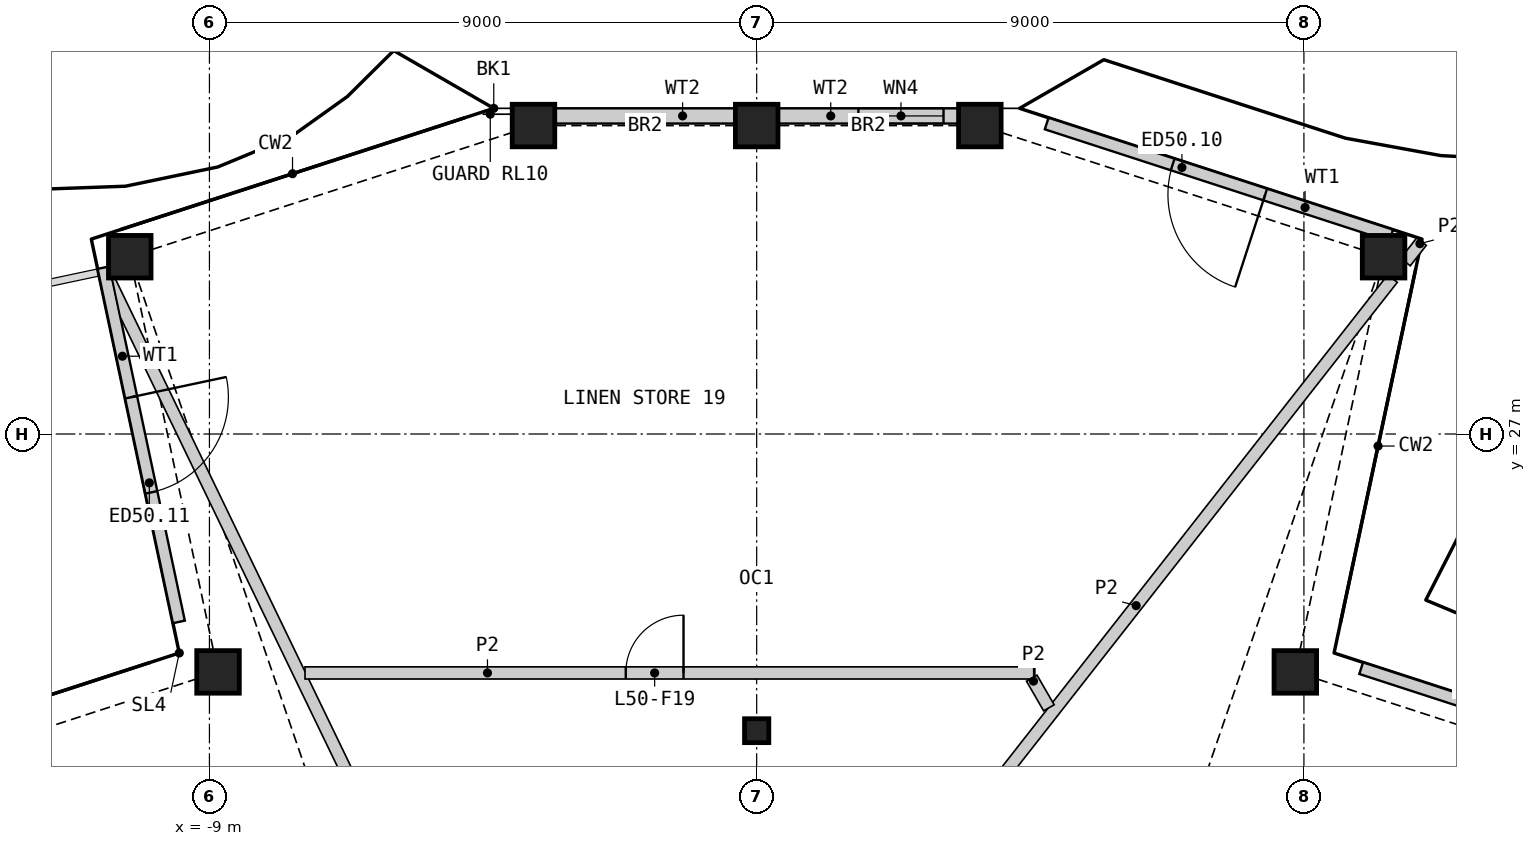
"""IFC4 building model, lengths in metres.
Left out: names, types, materials, properties, quantities, classifications, styles, units other than length and angle.
Written with IfcOpenShell. Run it as: python <this file> out.ifc"""

import sys

from ifc_helpers import new_model, si_unit, direction, frame, frame_2d, origin, origin_2d, place, context, subcontext, project, spatial, polyline, rectangle, hollow_rectangle, i_section, outline, extrude, element, fill, save


model = new_model("IFC4")
c1 = context("Model", 3, precision=1e-05, world=origin(), true_north=direction((0.0, 1.0)))
c2 = subcontext(c1, "Body", "Model", "MODEL_VIEW")
j1 = project(units=[si_unit("LENGTHUNIT", "METRE"), si_unit("PLANEANGLEUNIT", "RADIAN")], contexts=[c1])
p1 = place(None, origin())
s1 = spatial("IfcSite", under=j1, at=p1, CompositionType="ELEMENT")
p2 = place(p1, origin())
s2 = spatial("IfcBuilding", under=s1, at=p2, CompositionType="ELEMENT")
p3 = place(p2, frame((0.0, 0.0, 231.0)))
s3 = spatial("IfcBuildingStorey", under=s2, at=p3, CompositionType="ELEMENT", Elevation=231.0)
for number, where, z_axis, x_axis in (
    (1, (8.859, 23.087, 0.0), (0.0, 0.0, 1.0), (1.0, 0.0, 0.0)),
    (2, (10.31, 29.916, 0.0), (0.0, 0.0, 1.0), (1.0, 0.0, 0.0)),
    (3, (3.67, 32.073, 0.0), (0.0, 0.0, 1.0), (1.0, 0.0, 0.0)),
    (4, (0.0, 32.073, 0.0), (0.0, 0.0, 1.0), (1.0, 0.0, 0.0)),
    (5, (-3.67, 32.073, 0.0), (0.0, 0.0, 1.0), (1.0, 0.0, 0.0)),
    (6, (-10.31, 29.916, 0.0), (0.0, 0.0, 1.0), (1.0, 0.0, 0.0)),
    (7, (-8.859, 23.087, 0.0), (0.0, 0.0, 1.0), (1.0, 0.0, 0.0)),
):
    element("IfcColumn", number, at=place(p3, frame(where, z_axis=z_axis, x_axis=x_axis)), inside=s3, PredefinedType="COLUMN", context=c2, shape_type="SweptSolid", body=[
        extrude(hollow_rectangle(XDim=0.7, YDim=0.7, WallThickness=0.045, at=origin_2d()), origin(), (0.0, 0.0, 1.0), 3.6),
    ])
p4 = place(p3, frame((0.0, 22.121, 0.0), z_axis=(0.0, 0.0, 1.0), x_axis=(1.0, 0.0, 0.0)))
e8 = element("IfcColumn", 8, at=p4, inside=s3, PredefinedType="COLUMN", context=c2, shape_type="SweptSolid", body=[
    extrude(i_section(OverallWidth=0.399, OverallDepth=0.393, WebThickness=0.023, FlangeThickness=0.037, at=origin_2d()), origin(), (0.0, 0.0, 1.0), 3.6),
])
p5 = place(p3, frame((15.607, 21.308, 0.0), z_axis=(0.0, 0.0, 1.0), x_axis=(-0.951065383831, 0.308989701572, 0.0)))
e9 = element("IfcWall", 9, at=p5, inside=s3, PredefinedType="SOLIDWALL", context=c2, shape_type="SweptSolid", body=[
    extrude(rectangle(XDim=5.958, YDim=0.2, at=frame_2d((2.979, 0.0))), origin(), (0.0, 0.0, 1.0), 2.701),
])
p6 = place(p5, frame((2.179, 0.0, 0.0)))
e10 = element("IfcOpeningElement", 10, at=p6, cuts=e9, PredefinedType="OPENING", context=c2, shape_type="SweptSolid", body=[
    extrude(rectangle(XDim=1.6, YDim=2.4, at=frame_2d((0.8, 1.2))), frame((0.0, 0.11, 0.0), z_axis=(0.0, -1.0, 0.0), x_axis=(1.0, 0.0, 0.0)), (0.0, 0.0, 1.0), 0.22),
])
p7 = place(p3, frame((10.435, 30.266, 0.0), z_axis=(0.0, 0.0, 1.0), x_axis=(-0.951061471046, 0.309001744805, 0.0)))
e11 = element("IfcWall", 11, at=p7, inside=s3, PredefinedType="SOLIDWALL", context=c2, shape_type="SweptSolid", body=[
    extrude(rectangle(XDim=5.957, YDim=0.2, at=frame_2d((2.979, 0.0))), origin(), (0.0, 0.0, 1.0), 2.701),
])
p8 = place(p7, frame((2.179, 0.0, 0.0)))
e12 = element("IfcOpeningElement", 12, at=p8, cuts=e11, PredefinedType="OPENING", context=c2, shape_type="SweptSolid", body=[
    extrude(rectangle(XDim=1.6, YDim=2.4, at=frame_2d((0.8, 1.2))), frame((0.0, 0.11, 0.0), z_axis=(0.0, -1.0, 0.0), x_axis=(1.0, 0.0, 0.0)), (0.0, 0.0, 1.0), 0.22),
])
p9 = place(p3, frame((3.823, 32.231, 0.0), z_axis=(0.0, 0.0, 1.0), x_axis=(-1.0, 0.0, 0.0)))
e13 = element("IfcWall", 13, at=p9, inside=s3, PredefinedType="SOLIDWALL", context=c2, shape_type="SweptSolid", body=[
    extrude(rectangle(XDim=3.473, YDim=0.25, at=frame_2d((1.736, 0.0))), origin(), (0.0, 0.0, 1.0), 2.701),
])
p10 = place(p9, frame((0.75, 0.0, 1.8)))
e14 = element("IfcOpeningElement", 14, at=p10, cuts=e13, PredefinedType="OPENING", context=c2, shape_type="SweptSolid", body=[
    extrude(rectangle(XDim=1.4, YDim=0.7, at=frame_2d((0.7, 0.35))), frame((0.0, 0.135, 0.0), z_axis=(0.0, -1.0, 0.0), x_axis=(1.0, 0.0, 0.0)), (0.0, 0.0, 1.0), 0.27),
])
p11 = place(p3, frame((-0.35, 32.231, 0.0), z_axis=(0.0, 0.0, 1.0), x_axis=(-1.0, 0.0, 0.0)))
e15 = element("IfcWall", 15, at=p11, inside=s3, PredefinedType="SOLIDWALL", context=c2, shape_type="SweptSolid", body=[
    extrude(rectangle(XDim=3.473, YDim=0.25, at=frame_2d((1.736, 0.0))), origin(), (0.0, 0.0, 1.0), 2.701),
])
p12 = place(p3, frame((-10.741, 29.737, 0.0), z_axis=(0.0, 0.0, 1.0), x_axis=(0.207891593624, -0.978151872308, 0.0)))
e16 = element("IfcWall", 16, at=p12, inside=s3, PredefinedType="SOLIDWALL", context=c2, shape_type="SweptSolid", body=[
    extrude(rectangle(XDim=5.958, YDim=0.2, at=frame_2d((2.979, 0.0))), origin(), (0.0, 0.0, 1.0), 2.701),
])
p13 = place(p12, frame((2.179, 0.0, 0.0)))
e17 = element("IfcOpeningElement", 17, at=p13, cuts=e16, PredefinedType="OPENING", context=c2, shape_type="SweptSolid", body=[
    extrude(rectangle(XDim=1.6, YDim=2.4, at=frame_2d((0.8, 1.2))), frame((0.0, 0.11, 0.0), z_axis=(0.0, -1.0, 0.0), x_axis=(1.0, 0.0, 0.0)), (0.0, 0.0, 1.0), 0.22),
])
p14 = place(p3, frame((2.025, 18.799, 0.0), z_axis=(0.0, 0.0, 1.0), x_axis=(0.616942368609, 0.787008331478, 0.0)))
e18 = element("IfcWall", 18, at=p14, inside=s3, PredefinedType="PARTITIONING", context=c2, shape_type="SweptSolid", body=[
    extrude(rectangle(XDim=13.668, YDim=0.2, at=frame_2d((6.834, 0.0))), origin(), (0.0, 0.0, 1.0), 2.404),
])
p15 = place(p3, origin())
e19 = element("IfcWall", 19, at=p15, inside=s3, PredefinedType="PARTITIONING", context=c2, shape_type="SweptSolid", body=[
    extrude(outline(polyline([(-5.561, 18.767), (-10.466, 28.923), (-10.64, 29.745), (-5.381, 18.854), (-5.561, 18.767)])), origin(), (0.0, 0.0, 1.0), 2.404),
])
p16 = place(p3, frame((-7.428, 23.071, 0.0), z_axis=(0.0, 0.0, 1.0), x_axis=(1.0, 0.0, 0.0)))
e20 = element("IfcWall", 20, at=p16, inside=s3, PredefinedType="PARTITIONING", context=c2, shape_type="SweptSolid", body=[
    extrude(rectangle(XDim=12.002, YDim=0.2, at=frame_2d((6.001, 0.0))), origin(), (0.0, 0.0, 1.0), 2.404),
])
p17 = place(p16, frame((5.275, 0.0, 0.0)))
e21 = element("IfcOpeningElement", 21, at=p17, cuts=e20, PredefinedType="OPENING", context=c2, shape_type="SweptSolid", body=[
    extrude(rectangle(XDim=0.95, YDim=2.1, at=frame_2d((0.475, 1.05))), frame((0.0, 0.11, 0.0), z_axis=(0.0, -1.0, 0.0), x_axis=(1.0, 0.0, 0.0)), (0.0, 0.0, 1.0), 0.22),
])
p18 = place(p3, frame((4.524, 22.984, 0.0), z_axis=(0.0, 0.0, 1.0), x_axis=(0.500248658738, -0.865881792989, 0.0)))
e22 = element("IfcWall", 22, at=p18, inside=s3, PredefinedType="PARTITIONING", context=c2, shape_type="SweptSolid", body=[
    extrude(rectangle(XDim=0.562, YDim=0.2, at=frame_2d((0.281, 0.0))), origin(), (0.0, 0.0, 1.0), 2.404),
])
p19 = place(p3, frame((10.67, 29.828, 0.0), z_axis=(0.0, 0.0, 1.0), x_axis=(0.617216179113, 0.786793612227, 0.0)))
e23 = element("IfcWall", 23, at=p19, inside=s3, PredefinedType="PARTITIONING", context=c2, shape_type="SweptSolid", body=[
    extrude(rectangle(XDim=0.427, YDim=0.2, at=frame_2d((0.214, 0.0))), origin(), (0.0, 0.0, 1.0), 2.404),
])
p20 = place(p8, origin())
e24 = element("IfcDoor", 24, at=p20, inside=s3, OperationType="DOUBLE_DOOR_SINGLE_SWING", PredefinedType="DOOR", context=c2, shape_type="SweptSolid", body=[
    extrude(rectangle(XDim=1.6, YDim=2.4, at=frame_2d((0.8, 1.2))), frame((0.0, 0.025, 0.0), z_axis=(0.0, -1.0, 0.0), x_axis=(1.0, 0.0, 0.0)), (0.0, 0.0, 1.0), 0.05),
])
fill(e12, e24)
p21 = place(p10, origin())
e25 = element("IfcWindow", 25, at=p21, inside=s3, PartitioningType="SINGLE_PANEL", PredefinedType="WINDOW", context=c2, shape_type="SweptSolid", body=[
    extrude(rectangle(XDim=1.4, YDim=0.7, at=frame_2d((0.7, 0.35))), frame((0.0, 0.03, 0.0), z_axis=(0.0, -1.0, 0.0), x_axis=(1.0, 0.0, 0.0)), (0.0, 0.0, 1.0), 0.06),
])
fill(e14, e25)
p22 = place(p13, origin())
e26 = element("IfcDoor", 26, at=p22, inside=s3, OperationType="DOUBLE_DOOR_SINGLE_SWING", PredefinedType="DOOR", context=c2, shape_type="SweptSolid", body=[
    extrude(rectangle(XDim=1.6, YDim=2.4, at=frame_2d((0.8, 1.2))), frame((0.0, 0.025, 0.0), z_axis=(0.0, -1.0, 0.0), x_axis=(1.0, 0.0, 0.0)), (0.0, 0.0, 1.0), 0.05),
])
fill(e17, e26)
p23 = place(p17, origin())
e27 = element("IfcDoor", 27, at=p23, inside=s3, OperationType="SINGLE_SWING_RIGHT", PredefinedType="DOOR", context=c2, shape_type="SweptSolid", body=[
    extrude(rectangle(XDim=0.95, YDim=2.1, at=frame_2d((0.475, 1.05))), frame((0.0, 0.025, 0.0), z_axis=(0.0, -1.0, 0.0), x_axis=(1.0, 0.0, 0.0)), (0.0, 0.0, 1.0), 0.05),
])
fill(e21, e27)
save(model, sys.argv[1])
